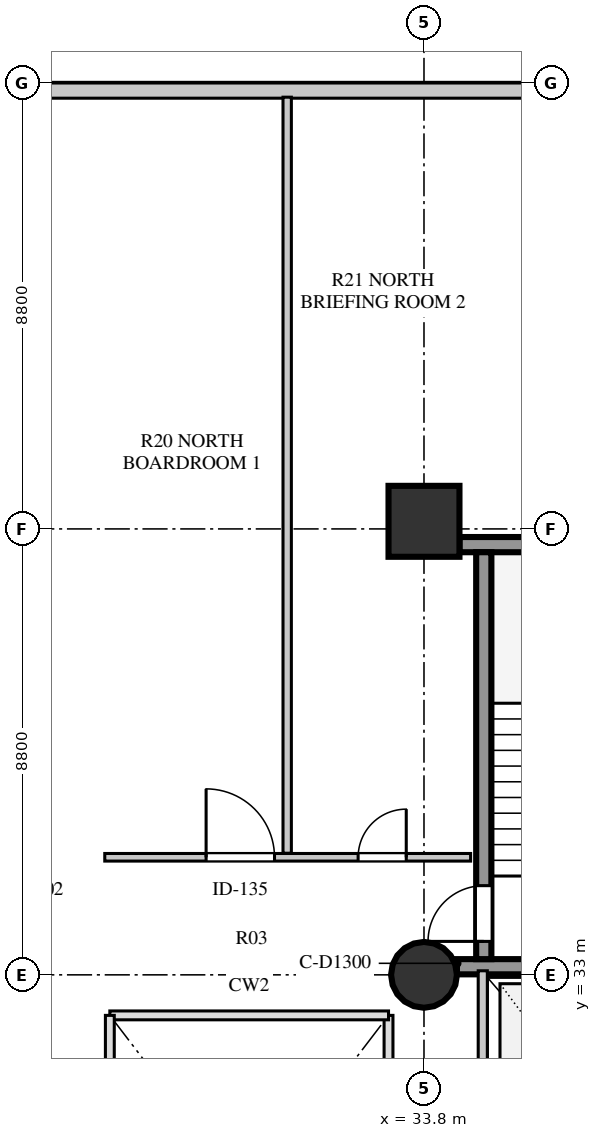
"""IFC4 building model, lengths in metres.
Left out: names, types, materials, properties, quantities, classifications, styles, units other than length and angle.
Written with IfcOpenShell. Run it as: python <this file> out.ifc"""

import sys

from ifc_helpers import new_model, si_unit, direction, frame, frame_2d, origin, origin_2d, place, context, subcontext, project, spatial, rectangle, circle, extrude, element, fill, save


model = new_model("IFC4")
c1 = context("Model", 3, precision=1e-05, world=origin(), true_north=direction((0.0, 1.0)))
c2 = subcontext(c1, "Body", "Model", "MODEL_VIEW")
j1 = project(units=[si_unit("LENGTHUNIT", "METRE"), si_unit("PLANEANGLEUNIT", "RADIAN")], contexts=[c1])
p1 = place(None, origin())
s1 = spatial("IfcSite", under=j1, at=p1, CompositionType="ELEMENT")
p2 = place(p1, origin())
s2 = spatial("IfcBuilding", under=s1, at=p2, CompositionType="ELEMENT")
p3 = place(p2, frame((0.0, 0.0, 17.0)))
s3 = spatial("IfcBuildingStorey", under=s2, at=p3, CompositionType="ELEMENT", Elevation=17.0)
p4 = place(p3, frame((34.45, 33.16, 0.0), z_axis=(0.0, 0.0, 1.0), x_axis=(1.0, 0.0, 0.0)))
e1 = element("IfcWall", 1, at=p4, inside=s3, PredefinedType="SHEAR", context=c2, shape_type="SweptSolid", body=[
    extrude(rectangle(XDim=4.42, YDim=0.3, at=frame_2d((2.21, 0.0))), origin(), (0.0, 0.0, 1.0), 4.22),
])
p5 = place(p3, frame((34.5, 41.49, 0.0), z_axis=(0.0, 0.0, 1.0), x_axis=(1.0, 0.0, 0.0)))
e2 = element("IfcWall", 2, at=p5, inside=s3, PredefinedType="SHEAR", context=c2, shape_type="SweptSolid", body=[
    extrude(rectangle(XDim=4.37, YDim=0.3, at=frame_2d((2.185, 0.0))), origin(), (0.0, 0.0, 1.0), 4.22),
])
p6 = place(p3, frame((34.98, 33.31, 0.0), z_axis=(0.0, 0.0, 1.0), x_axis=(0.0, 1.0, 0.0)))
e3 = element("IfcWall", 3, at=p6, inside=s3, PredefinedType="SHEAR", context=c2, shape_type="SweptSolid", body=[
    extrude(rectangle(XDim=8.03, YDim=0.3, at=frame_2d((4.015, 0.0))), origin(), (0.0, 0.0, 1.0), 4.22),
])
p7 = place(p6, frame((0.35, 0.0, 0.0)))
e4 = element("IfcOpeningElement", 4, at=p7, cuts=e3, PredefinedType="OPENING", context=c2, shape_type="SweptSolid", body=[
    extrude(rectangle(XDim=1.1, YDim=2.1, at=frame_2d((0.55, 1.05))), frame((0.0, 0.16, 0.0), z_axis=(0.0, -1.0, 0.0), x_axis=(1.0, 0.0, 0.0)), (0.0, 0.0, 1.0), 0.32),
])
p8 = place(p3, frame((33.8, 33.0, 0.0), z_axis=(0.0, 0.0, 1.0), x_axis=(1.0, 0.0, 0.0)))
e5 = element("IfcColumn", 5, at=p8, inside=s3, PredefinedType="COLUMN", context=c2, shape_type="SweptSolid", body=[
    extrude(circle(Radius=0.65, at=origin_2d()), origin(), (0.0, 0.0, 1.0), 4.22),
])
p9 = place(p3, frame((33.8, 41.95, 0.0), z_axis=(0.0, 0.0, 1.0), x_axis=(1.0, 0.0, 0.0)))
e6 = element("IfcColumn", 6, at=p9, inside=s3, PredefinedType="COLUMN", context=c2, shape_type="SweptSolid", body=[
    extrude(rectangle(XDim=1.4, YDim=1.4, at=origin_2d()), origin(), (0.0, 0.0, 1.0), 4.22),
])
p10 = place(p3, frame((46.3, 50.45, 0.0), z_axis=(0.0, 0.0, 1.0), x_axis=(-1.0, 0.0, 0.0)))
e7 = element("IfcWall", 7, at=p10, inside=s3, PredefinedType="STANDARD", context=c2, shape_type="SweptSolid", body=[
    extrude(rectangle(XDim=34.0, YDim=0.3, at=frame_2d((17.0, 0.0))), origin(), (0.0, 0.0, 1.0), 4.22),
])
p11 = place(p10, frame((23.345, 0.0, 0.8)))
e8 = element("IfcOpeningElement", 8, at=p11, cuts=e7, PredefinedType="OPENING", context=c2, shape_type="SweptSolid", body=[
    extrude(rectangle(XDim=2.4, YDim=2.05, at=frame_2d((1.2, 1.025))), frame((0.0, 0.16, 0.0), z_axis=(0.0, -1.0, 0.0), x_axis=(1.0, 0.0, 0.0)), (0.0, 0.0, 1.0), 0.32),
])
p12 = place(p10, frame((6.605, 0.0, 0.8)))
e9 = element("IfcOpeningElement", 9, at=p12, cuts=e7, PredefinedType="OPENING", context=c2, shape_type="SweptSolid", body=[
    extrude(rectangle(XDim=2.1, YDim=1.95, at=frame_2d((1.05, 0.975))), frame((0.0, 0.16, 0.0), z_axis=(0.0, -1.0, 0.0), x_axis=(1.0, 0.0, 0.0)), (0.0, 0.0, 1.0), 0.32),
])
p13 = place(p3, frame((34.96, 28.86, 0.0), z_axis=(0.0, 0.0, 1.0), x_axis=(0.0, 1.0, 0.0)))
e10 = element("IfcWall", 10, at=p13, inside=s3, PredefinedType="SOLIDWALL", context=c2, shape_type="SweptSolid", body=[
    extrude(rectangle(XDim=4.22, YDim=0.18, at=frame_2d((2.11, 0.0))), origin(), (0.0, 0.0, 1.0), 4.22),
])
p14 = place(p3, frame((27.5, 35.32, 0.0), z_axis=(0.0, 0.0, 1.0), x_axis=(1.0, 0.0, 0.0)))
e11 = element("IfcWall", 11, at=p14, inside=s3, PredefinedType="PARTITIONING", context=c2, shape_type="SweptSolid", body=[
    extrude(rectangle(XDim=7.22, YDim=0.15, at=frame_2d((3.61, 0.0))), origin(), (0.0, 0.0, 1.0), 4.22),
])
p15 = place(p14, frame((5.0, 0.0, 0.0)))
e12 = element("IfcOpeningElement", 12, at=p15, cuts=e11, PredefinedType="OPENING", context=c2, shape_type="SweptSolid", body=[
    extrude(rectangle(XDim=0.95, YDim=2.08, at=frame_2d((0.475, 1.04))), frame((0.0, 0.085, 0.0), z_axis=(0.0, -1.0, 0.0), x_axis=(1.0, 0.0, 0.0)), (0.0, 0.0, 1.0), 0.17),
])
p16 = place(p14, frame((2.0, 0.0, 0.0)))
e13 = element("IfcOpeningElement", 13, at=p16, cuts=e11, PredefinedType="OPENING", context=c2, shape_type="SweptSolid", body=[
    extrude(rectangle(XDim=1.35, YDim=2.1, at=frame_2d((0.675, 1.05))), frame((0.0, 0.085, 0.0), z_axis=(0.0, -1.0, 0.0), x_axis=(1.0, 0.0, 0.0)), (0.0, 0.0, 1.0), 0.17),
])
p17 = place(p3, frame((31.1, 35.4, 0.0), z_axis=(0.0, 0.0, 1.0), x_axis=(0.0, 1.0, 0.0)))
e14 = element("IfcWall", 14, at=p17, inside=s3, PredefinedType="PARTITIONING", context=c2, shape_type="SweptSolid", body=[
    extrude(rectangle(XDim=14.92, YDim=0.165, at=frame_2d((7.46, 0.0))), origin(), (0.0, 0.0, 1.0), 4.22),
])
p18 = place(p7, origin())
e15 = element("IfcDoor", 15, at=p18, inside=s3, OperationType="SINGLE_SWING_LEFT", PredefinedType="DOOR", context=c2, shape_type="SweptSolid", body=[
    extrude(rectangle(XDim=1.1, YDim=2.1, at=frame_2d((0.55, 1.05))), frame((0.0, 0.025, 0.0), z_axis=(0.0, -1.0, 0.0), x_axis=(1.0, 0.0, 0.0)), (0.0, 0.0, 1.0), 0.05),
])
fill(e4, e15)
p19 = place(p15, origin())
e16 = element("IfcDoor", 16, at=p19, inside=s3, OperationType="SINGLE_SWING_RIGHT", PredefinedType="DOOR", context=c2, shape_type="SweptSolid", body=[
    extrude(rectangle(XDim=0.95, YDim=2.08, at=frame_2d((0.475, 1.04))), frame((0.0, 0.025, 0.0), z_axis=(0.0, -1.0, 0.0), x_axis=(1.0, 0.0, 0.0)), (0.0, 0.0, 1.0), 0.05),
])
fill(e12, e16)
p20 = place(p16, origin())
e17 = element("IfcDoor", 17, at=p20, inside=s3, OperationType="SINGLE_SWING_LEFT", PredefinedType="DOOR", context=c2, shape_type="SweptSolid", body=[
    extrude(rectangle(XDim=1.35, YDim=2.1, at=frame_2d((0.675, 1.05))), frame((0.0, 0.025, 0.0), z_axis=(0.0, -1.0, 0.0), x_axis=(1.0, 0.0, 0.0)), (0.0, 0.0, 1.0), 0.05),
])
fill(e13, e17)
save(model, sys.argv[1])
